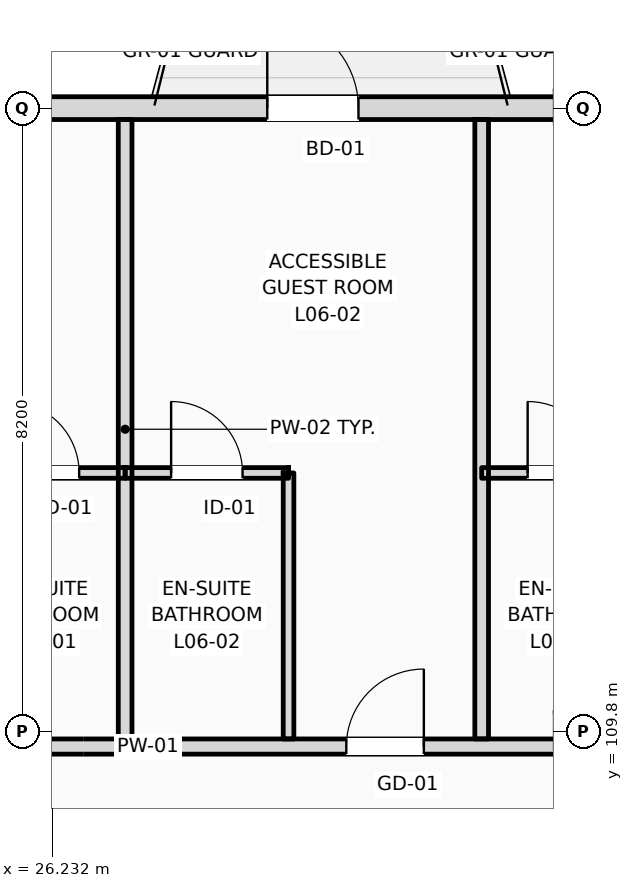
"""IFC4 building model, lengths in metres.
Left out: names, types, materials, properties, quantities, classifications, styles, units other than length and angle.
Written with IfcOpenShell. Run it as: python <this file> out.ifc"""

import sys

from ifc_helpers import new_model, si_unit, direction, frame, frame_2d, origin, place, context, subcontext, project, spatial, rectangle, extrude, element, fill, save


model = new_model("IFC4")
c1 = context("Model", 3, precision=1e-05, world=origin(), true_north=direction((0.0, 1.0)))
c2 = subcontext(c1, "Body", "Model", "MODEL_VIEW")
j1 = project(units=[si_unit("LENGTHUNIT", "METRE"), si_unit("PLANEANGLEUNIT", "RADIAN")], contexts=[c1])
p1 = place(None, origin())
s1 = spatial("IfcSite", under=j1, at=p1, CompositionType="ELEMENT")
p2 = place(p1, origin())
s2 = spatial("IfcBuilding", under=s1, at=p2, CompositionType="ELEMENT")
p3 = place(p2, frame((0.0, 0.0, 28.2)))
s3 = spatial("IfcBuildingStorey", under=s2, at=p3, CompositionType="ELEMENT", Elevation=28.2)
p4 = place(p3, frame((22.5, 118.0, 0.0), z_axis=(0.0, 0.0, 1.0), x_axis=(1.0, 0.0, 0.0)))
e1 = element("IfcWall", 1, at=p4, inside=s3, PredefinedType="STANDARD", context=c2, shape_type="SweptSolid", body=[
    extrude(rectangle(XDim=97.5, YDim=0.3, at=frame_2d((48.75, 0.0))), origin(), (0.0, 0.0, 1.0), 2.8),
])
p5 = place(p4, frame((0.91, 0.0, 0.9)))
e2 = element("IfcOpeningElement", 2, at=p5, cuts=e1, PredefinedType="OPENING", context=c2, shape_type="SweptSolid", body=[
    extrude(rectangle(XDim=0.9, YDim=1.72, at=frame_2d((0.45, 0.86))), frame((0.0, 0.16, 0.0), z_axis=(0.0, -1.0, 0.0), x_axis=(1.0, 0.0, 0.0)), (0.0, 0.0, 1.0), 0.32),
])
p6 = place(p4, frame((6.561, 0.0, 0.0)))
e3 = element("IfcOpeningElement", 3, at=p6, cuts=e1, PredefinedType="OPENING", context=c2, shape_type="SweptSolid", body=[
    extrude(rectangle(XDim=1.2, YDim=2.25, at=frame_2d((0.6, 1.125))), frame((0.0, 0.16, 0.0), z_axis=(0.0, -1.0, 0.0), x_axis=(1.0, 0.0, 0.0)), (0.0, 0.0, 1.0), 0.32),
])
p7 = place(p4, frame((11.477, 0.0, 0.9)))
e4 = element("IfcOpeningElement", 4, at=p7, cuts=e1, PredefinedType="OPENING", context=c2, shape_type="SweptSolid", body=[
    extrude(rectangle(XDim=1.1, YDim=1.5, at=frame_2d((0.55, 0.75))), frame((0.0, 0.16, 0.0), z_axis=(0.0, -1.0, 0.0), x_axis=(1.0, 0.0, 0.0)), (0.0, 0.0, 1.0), 0.32),
])
p8 = place(p4, frame((15.194, 0.0, 0.9)))
e5 = element("IfcOpeningElement", 5, at=p8, cuts=e1, PredefinedType="OPENING", context=c2, shape_type="SweptSolid", body=[
    extrude(rectangle(XDim=1.25, YDim=1.6, at=frame_2d((0.625, 0.8))), frame((0.0, 0.16, 0.0), z_axis=(0.0, -1.0, 0.0), x_axis=(1.0, 0.0, 0.0)), (0.0, 0.0, 1.0), 0.32),
])
p9 = place(p4, frame((19.509, 0.0, 0.9)))
e6 = element("IfcOpeningElement", 6, at=p9, cuts=e1, PredefinedType="OPENING", context=c2, shape_type="SweptSolid", body=[
    extrude(rectangle(XDim=1.4, YDim=1.7, at=frame_2d((0.7, 0.85))), frame((0.0, 0.16, 0.0), z_axis=(0.0, -1.0, 0.0), x_axis=(1.0, 0.0, 0.0)), (0.0, 0.0, 1.0), 0.32),
])
p10 = place(p4, frame((23.258, 0.0, 0.0)))
e7 = element("IfcOpeningElement", 7, at=p10, cuts=e1, PredefinedType="OPENING", context=c2, shape_type="SweptSolid", body=[
    extrude(rectangle(XDim=1.2, YDim=2.25, at=frame_2d((0.6, 1.125))), frame((0.0, 0.16, 0.0), z_axis=(0.0, -1.0, 0.0), x_axis=(1.0, 0.0, 0.0)), (0.0, 0.0, 1.0), 0.32),
])
p11 = place(p4, frame((28.115, 0.0, 0.9)))
e8 = element("IfcOpeningElement", 8, at=p11, cuts=e1, PredefinedType="OPENING", context=c2, shape_type="SweptSolid", body=[
    extrude(rectangle(XDim=1.75, YDim=1.72, at=frame_2d((0.875, 0.86))), frame((0.0, 0.16, 0.0), z_axis=(0.0, -1.0, 0.0), x_axis=(1.0, 0.0, 0.0)), (0.0, 0.0, 1.0), 0.32),
])
p12 = place(p4, frame((31.582, 0.0, 0.9)))
e9 = element("IfcOpeningElement", 9, at=p12, cuts=e1, PredefinedType="OPENING", context=c2, shape_type="SweptSolid", body=[
    extrude(rectangle(XDim=1.35, YDim=1.72, at=frame_2d((0.675, 0.86))), frame((0.0, 0.16, 0.0), z_axis=(0.0, -1.0, 0.0), x_axis=(1.0, 0.0, 0.0)), (0.0, 0.0, 1.0), 0.32),
])
p13 = place(p4, frame((37.379, 0.0, 0.0)))
e10 = element("IfcOpeningElement", 10, at=p13, cuts=e1, PredefinedType="OPENING", context=c2, shape_type="SweptSolid", body=[
    extrude(rectangle(XDim=1.2, YDim=2.25, at=frame_2d((0.6, 1.125))), frame((0.0, 0.16, 0.0), z_axis=(0.0, -1.0, 0.0), x_axis=(1.0, 0.0, 0.0)), (0.0, 0.0, 1.0), 0.32),
])
p14 = place(p4, frame((42.663, 0.0, 0.9)))
e11 = element("IfcOpeningElement", 11, at=p14, cuts=e1, PredefinedType="OPENING", context=c2, shape_type="SweptSolid", body=[
    extrude(rectangle(XDim=1.35, YDim=1.72, at=frame_2d((0.675, 0.86))), frame((0.0, 0.16, 0.0), z_axis=(0.0, -1.0, 0.0), x_axis=(1.0, 0.0, 0.0)), (0.0, 0.0, 1.0), 0.32),
])
p15 = place(p4, frame((45.119, 0.0, 0.9)))
e12 = element("IfcOpeningElement", 12, at=p15, cuts=e1, PredefinedType="OPENING", context=c2, shape_type="SweptSolid", body=[
    extrude(rectangle(XDim=2.871, YDim=1.72, at=frame_2d((1.436, 0.86))), frame((0.0, 0.16, 0.0), z_axis=(0.0, -1.0, 0.0), x_axis=(1.0, 0.0, 0.0)), (0.0, 0.0, 1.0), 0.32),
])
p16 = place(p4, frame((50.41, 0.0, 0.9)))
e13 = element("IfcOpeningElement", 13, at=p16, cuts=e1, PredefinedType="OPENING", context=c2, shape_type="SweptSolid", body=[
    extrude(rectangle(XDim=1.8, YDim=1.72, at=frame_2d((0.9, 0.86))), frame((0.0, 0.16, 0.0), z_axis=(0.0, -1.0, 0.0), x_axis=(1.0, 0.0, 0.0)), (0.0, 0.0, 1.0), 0.32),
])
p17 = place(p4, frame((54.375, 0.0, 0.0)))
e14 = element("IfcOpeningElement", 14, at=p17, cuts=e1, PredefinedType="OPENING", context=c2, shape_type="SweptSolid", body=[
    extrude(rectangle(XDim=1.2, YDim=2.25, at=frame_2d((0.6, 1.125))), frame((0.0, 0.16, 0.0), z_axis=(0.0, -1.0, 0.0), x_axis=(1.0, 0.0, 0.0)), (0.0, 0.0, 1.0), 0.32),
])
p18 = place(p4, frame((59.052, 0.0, 0.9)))
e15 = element("IfcOpeningElement", 15, at=p18, cuts=e1, PredefinedType="OPENING", context=c2, shape_type="SweptSolid", body=[
    extrude(rectangle(XDim=1.35, YDim=1.72, at=frame_2d((0.675, 0.86))), frame((0.0, 0.16, 0.0), z_axis=(0.0, -1.0, 0.0), x_axis=(1.0, 0.0, 0.0)), (0.0, 0.0, 1.0), 0.32),
])
p19 = place(p4, frame((62.768, 0.0, 0.9)))
e16 = element("IfcOpeningElement", 16, at=p19, cuts=e1, PredefinedType="OPENING", context=c2, shape_type="SweptSolid", body=[
    extrude(rectangle(XDim=1.5, YDim=1.72, at=frame_2d((0.75, 0.86))), frame((0.0, 0.16, 0.0), z_axis=(0.0, -1.0, 0.0), x_axis=(1.0, 0.0, 0.0)), (0.0, 0.0, 1.0), 0.32),
])
p20 = place(p4, frame((68.498, 0.0, 0.0)))
e17 = element("IfcOpeningElement", 17, at=p20, cuts=e1, PredefinedType="OPENING", context=c2, shape_type="SweptSolid", body=[
    extrude(rectangle(XDim=1.2, YDim=2.25, at=frame_2d((0.6, 1.125))), frame((0.0, 0.16, 0.0), z_axis=(0.0, -1.0, 0.0), x_axis=(1.0, 0.0, 0.0)), (0.0, 0.0, 1.0), 0.32),
])
p21 = place(p4, frame((71.265, 0.0, 0.9)))
e18 = element("IfcOpeningElement", 18, at=p21, cuts=e1, PredefinedType="OPENING", context=c2, shape_type="SweptSolid", body=[
    extrude(rectangle(XDim=0.9, YDim=1.72, at=frame_2d((0.45, 0.86))), frame((0.0, 0.16, 0.0), z_axis=(0.0, -1.0, 0.0), x_axis=(1.0, 0.0, 0.0)), (0.0, 0.0, 1.0), 0.32),
])
p22 = place(p4, frame((76.316, 0.0, 0.9)))
e19 = element("IfcOpeningElement", 19, at=p22, cuts=e1, PredefinedType="OPENING", context=c2, shape_type="SweptSolid", body=[
    extrude(rectangle(XDim=1.95, YDim=1.72, at=frame_2d((0.975, 0.86))), frame((0.0, 0.16, 0.0), z_axis=(0.0, -1.0, 0.0), x_axis=(1.0, 0.0, 0.0)), (0.0, 0.0, 1.0), 0.32),
])
p23 = place(p4, frame((81.632, 0.0, 0.9)))
e20 = element("IfcOpeningElement", 20, at=p23, cuts=e1, PredefinedType="OPENING", context=c2, shape_type="SweptSolid", body=[
    extrude(rectangle(XDim=1.35, YDim=1.72, at=frame_2d((0.675, 0.86))), frame((0.0, 0.16, 0.0), z_axis=(0.0, -1.0, 0.0), x_axis=(1.0, 0.0, 0.0)), (0.0, 0.0, 1.0), 0.32),
])
p24 = place(p4, frame((84.948, 0.0, 0.9)))
e21 = element("IfcOpeningElement", 21, at=p24, cuts=e1, PredefinedType="OPENING", context=c2, shape_type="SweptSolid", body=[
    extrude(rectangle(XDim=2.25, YDim=1.72, at=frame_2d((1.125, 0.86))), frame((0.0, 0.16, 0.0), z_axis=(0.0, -1.0, 0.0), x_axis=(1.0, 0.0, 0.0)), (0.0, 0.0, 1.0), 0.32),
])
p25 = place(p4, frame((90.063, 0.0, 0.9)))
e22 = element("IfcOpeningElement", 22, at=p25, cuts=e1, PredefinedType="OPENING", context=c2, shape_type="SweptSolid", body=[
    extrude(rectangle(XDim=1.8, YDim=1.72, at=frame_2d((0.9, 0.86))), frame((0.0, 0.16, 0.0), z_axis=(0.0, -1.0, 0.0), x_axis=(1.0, 0.0, 0.0)), (0.0, 0.0, 1.0), 0.32),
])
p26 = place(p4, frame((93.529, 0.0, 0.9)))
e23 = element("IfcOpeningElement", 23, at=p26, cuts=e1, PredefinedType="OPENING", context=c2, shape_type="SweptSolid", body=[
    extrude(rectangle(XDim=2.55, YDim=1.72, at=frame_2d((1.275, 0.86))), frame((0.0, 0.16, 0.0), z_axis=(0.0, -1.0, 0.0), x_axis=(1.0, 0.0, 0.0)), (0.0, 0.0, 1.0), 0.32),
])
p27 = place(p3, frame((10.65, 109.6, 0.0), z_axis=(0.0, 0.0, 1.0), x_axis=(1.0, 0.0, 0.0)))
e24 = element("IfcWall", 24, at=p27, inside=s3, PredefinedType="PARTITIONING", context=c2, shape_type="SweptSolid", body=[
    extrude(rectangle(XDim=109.21, YDim=0.2, at=frame_2d((54.605, 0.0))), origin(), (0.0, 0.0, 1.0), 2.8),
])
p28 = place(p27, frame((12.611, 0.0, 0.0)))
e25 = element("IfcOpeningElement", 25, at=p28, cuts=e24, PredefinedType="OPENING", context=c2, shape_type="SweptSolid", body=[
    extrude(rectangle(XDim=1.02, YDim=2.2, at=frame_2d((0.51, 1.1))), frame((0.0, 0.11, 0.0), z_axis=(0.0, -1.0, 0.0), x_axis=(1.0, 0.0, 0.0)), (0.0, 0.0, 1.0), 0.22),
])
p29 = place(p27, frame((19.451, 0.0, 0.0)))
e26 = element("IfcOpeningElement", 26, at=p29, cuts=e24, PredefinedType="OPENING", context=c2, shape_type="SweptSolid", body=[
    extrude(rectangle(XDim=1.02, YDim=2.2, at=frame_2d((0.51, 1.1))), frame((0.0, 0.11, 0.0), z_axis=(0.0, -1.0, 0.0), x_axis=(1.0, 0.0, 0.0)), (0.0, 0.0, 1.0), 0.22),
])
p30 = place(p27, frame((23.842, 0.0, 0.0)))
e27 = element("IfcOpeningElement", 27, at=p30, cuts=e24, PredefinedType="OPENING", context=c2, shape_type="SweptSolid", body=[
    extrude(rectangle(XDim=1.02, YDim=2.2, at=frame_2d((0.51, 1.1))), frame((0.0, 0.11, 0.0), z_axis=(0.0, -1.0, 0.0), x_axis=(1.0, 0.0, 0.0)), (0.0, 0.0, 1.0), 0.22),
])
p31 = place(p27, frame((26.084, 0.0, 0.0)))
e28 = element("IfcOpeningElement", 28, at=p31, cuts=e24, PredefinedType="OPENING", context=c2, shape_type="SweptSolid", body=[
    extrude(rectangle(XDim=1.02, YDim=2.2, at=frame_2d((0.51, 1.1))), frame((0.0, 0.11, 0.0), z_axis=(0.0, -1.0, 0.0), x_axis=(1.0, 0.0, 0.0)), (0.0, 0.0, 1.0), 0.22),
])
p32 = place(p27, frame((32.655, 0.0, 0.0)))
e29 = element("IfcOpeningElement", 29, at=p32, cuts=e24, PredefinedType="OPENING", context=c2, shape_type="SweptSolid", body=[
    extrude(rectangle(XDim=0.96, YDim=2.2, at=frame_2d((0.48, 1.1))), frame((0.0, 0.11, 0.0), z_axis=(0.0, -1.0, 0.0), x_axis=(1.0, 0.0, 0.0)), (0.0, 0.0, 1.0), 0.22),
])
p33 = place(p27, frame((34.895, 0.0, 0.0)))
e30 = element("IfcOpeningElement", 30, at=p33, cuts=e24, PredefinedType="OPENING", context=c2, shape_type="SweptSolid", body=[
    extrude(rectangle(XDim=0.96, YDim=2.2, at=frame_2d((0.48, 1.1))), frame((0.0, 0.11, 0.0), z_axis=(0.0, -1.0, 0.0), x_axis=(1.0, 0.0, 0.0)), (0.0, 0.0, 1.0), 0.22),
])
p34 = place(p27, frame((41.436, 0.0, 0.0)))
e31 = element("IfcOpeningElement", 31, at=p34, cuts=e24, PredefinedType="OPENING", context=c2, shape_type="SweptSolid", body=[
    extrude(rectangle(XDim=0.96, YDim=2.2, at=frame_2d((0.48, 1.1))), frame((0.0, 0.11, 0.0), z_axis=(0.0, -1.0, 0.0), x_axis=(1.0, 0.0, 0.0)), (0.0, 0.0, 1.0), 0.22),
])
p35 = place(p27, frame((43.427, 0.0, 0.0)))
e32 = element("IfcOpeningElement", 32, at=p35, cuts=e24, PredefinedType="OPENING", context=c2, shape_type="SweptSolid", body=[
    extrude(rectangle(XDim=0.96, YDim=2.2, at=frame_2d((0.48, 1.1))), frame((0.0, 0.11, 0.0), z_axis=(0.0, -1.0, 0.0), x_axis=(1.0, 0.0, 0.0)), (0.0, 0.0, 1.0), 0.22),
])
p36 = place(p27, frame((50.218, 0.0, 0.0)))
e33 = element("IfcOpeningElement", 33, at=p36, cuts=e24, PredefinedType="OPENING", context=c2, shape_type="SweptSolid", body=[
    extrude(rectangle(XDim=0.96, YDim=2.2, at=frame_2d((0.48, 1.1))), frame((0.0, 0.11, 0.0), z_axis=(0.0, -1.0, 0.0), x_axis=(1.0, 0.0, 0.0)), (0.0, 0.0, 1.0), 0.22),
])
p37 = place(p27, frame((54.859, 0.0, 0.0)))
e34 = element("IfcOpeningElement", 34, at=p37, cuts=e24, PredefinedType="OPENING", context=c2, shape_type="SweptSolid", body=[
    extrude(rectangle(XDim=0.96, YDim=2.2, at=frame_2d((0.48, 1.1))), frame((0.0, 0.11, 0.0), z_axis=(0.0, -1.0, 0.0), x_axis=(1.0, 0.0, 0.0)), (0.0, 0.0, 1.0), 0.22),
])
p38 = place(p27, frame((59.0, 0.0, 0.0)))
e35 = element("IfcOpeningElement", 35, at=p38, cuts=e24, PredefinedType="OPENING", context=c2, shape_type="SweptSolid", body=[
    extrude(rectangle(XDim=0.96, YDim=2.2, at=frame_2d((0.48, 1.1))), frame((0.0, 0.11, 0.0), z_axis=(0.0, -1.0, 0.0), x_axis=(1.0, 0.0, 0.0)), (0.0, 0.0, 1.0), 0.22),
])
p39 = place(p27, frame((63.39, 0.0, 0.0)))
e36 = element("IfcOpeningElement", 36, at=p39, cuts=e24, PredefinedType="OPENING", context=c2, shape_type="SweptSolid", body=[
    extrude(rectangle(XDim=0.96, YDim=2.2, at=frame_2d((0.48, 1.1))), frame((0.0, 0.11, 0.0), z_axis=(0.0, -1.0, 0.0), x_axis=(1.0, 0.0, 0.0)), (0.0, 0.0, 1.0), 0.22),
])
p40 = place(p27, frame((65.631, 0.0, 0.0)))
e37 = element("IfcOpeningElement", 37, at=p40, cuts=e24, PredefinedType="OPENING", context=c2, shape_type="SweptSolid", body=[
    extrude(rectangle(XDim=0.96, YDim=2.2, at=frame_2d((0.48, 1.1))), frame((0.0, 0.11, 0.0), z_axis=(0.0, -1.0, 0.0), x_axis=(1.0, 0.0, 0.0)), (0.0, 0.0, 1.0), 0.22),
])
p41 = place(p27, frame((72.172, 0.0, 0.0)))
e38 = element("IfcOpeningElement", 38, at=p41, cuts=e24, PredefinedType="OPENING", context=c2, shape_type="SweptSolid", body=[
    extrude(rectangle(XDim=0.96, YDim=2.2, at=frame_2d((0.48, 1.1))), frame((0.0, 0.11, 0.0), z_axis=(0.0, -1.0, 0.0), x_axis=(1.0, 0.0, 0.0)), (0.0, 0.0, 1.0), 0.22),
])
p42 = place(p27, frame((74.413, 0.0, 0.0)))
e39 = element("IfcOpeningElement", 39, at=p42, cuts=e24, PredefinedType="OPENING", context=c2, shape_type="SweptSolid", body=[
    extrude(rectangle(XDim=0.96, YDim=2.2, at=frame_2d((0.48, 1.1))), frame((0.0, 0.11, 0.0), z_axis=(0.0, -1.0, 0.0), x_axis=(1.0, 0.0, 0.0)), (0.0, 0.0, 1.0), 0.22),
])
p43 = place(p27, frame((80.954, 0.0, 0.0)))
e40 = element("IfcOpeningElement", 40, at=p43, cuts=e24, PredefinedType="OPENING", context=c2, shape_type="SweptSolid", body=[
    extrude(rectangle(XDim=0.96, YDim=2.2, at=frame_2d((0.48, 1.1))), frame((0.0, 0.11, 0.0), z_axis=(0.0, -1.0, 0.0), x_axis=(1.0, 0.0, 0.0)), (0.0, 0.0, 1.0), 0.22),
])
p44 = place(p27, frame((83.195, 0.0, 0.0)))
e41 = element("IfcOpeningElement", 41, at=p44, cuts=e24, PredefinedType="OPENING", context=c2, shape_type="SweptSolid", body=[
    extrude(rectangle(XDim=0.96, YDim=2.2, at=frame_2d((0.48, 1.1))), frame((0.0, 0.11, 0.0), z_axis=(0.0, -1.0, 0.0), x_axis=(1.0, 0.0, 0.0)), (0.0, 0.0, 1.0), 0.22),
])
p45 = place(p27, frame((89.735, 0.0, 0.0)))
e42 = element("IfcOpeningElement", 42, at=p45, cuts=e24, PredefinedType="OPENING", context=c2, shape_type="SweptSolid", body=[
    extrude(rectangle(XDim=0.96, YDim=2.2, at=frame_2d((0.48, 1.1))), frame((0.0, 0.11, 0.0), z_axis=(0.0, -1.0, 0.0), x_axis=(1.0, 0.0, 0.0)), (0.0, 0.0, 1.0), 0.22),
])
p46 = place(p27, frame((94.126, 0.0, 0.0)))
e43 = element("IfcOpeningElement", 43, at=p46, cuts=e24, PredefinedType="OPENING", context=c2, shape_type="SweptSolid", body=[
    extrude(rectangle(XDim=0.96, YDim=2.2, at=frame_2d((0.48, 1.1))), frame((0.0, 0.11, 0.0), z_axis=(0.0, -1.0, 0.0), x_axis=(1.0, 0.0, 0.0)), (0.0, 0.0, 1.0), 0.22),
])
p47 = place(p27, frame((98.517, 0.0, 0.0)))
e44 = element("IfcOpeningElement", 44, at=p47, cuts=e24, PredefinedType="OPENING", context=c2, shape_type="SweptSolid", body=[
    extrude(rectangle(XDim=0.96, YDim=2.2, at=frame_2d((0.48, 1.1))), frame((0.0, 0.11, 0.0), z_axis=(0.0, -1.0, 0.0), x_axis=(1.0, 0.0, 0.0)), (0.0, 0.0, 1.0), 0.22),
])
p48 = place(p27, frame((102.908, 0.0, 0.0)))
e45 = element("IfcOpeningElement", 45, at=p48, cuts=e24, PredefinedType="OPENING", context=c2, shape_type="SweptSolid", body=[
    extrude(rectangle(XDim=0.96, YDim=2.2, at=frame_2d((0.48, 1.1))), frame((0.0, 0.11, 0.0), z_axis=(0.0, -1.0, 0.0), x_axis=(1.0, 0.0, 0.0)), (0.0, 0.0, 1.0), 0.22),
])
p49 = place(p27, frame((105.099, 0.0, 0.0)))
e46 = element("IfcOpeningElement", 46, at=p49, cuts=e24, PredefinedType="OPENING", context=c2, shape_type="SweptSolid", body=[
    extrude(rectangle(XDim=0.96, YDim=2.2, at=frame_2d((0.48, 1.1))), frame((0.0, 0.11, 0.0), z_axis=(0.0, -1.0, 0.0), x_axis=(1.0, 0.0, 0.0)), (0.0, 0.0, 1.0), 0.22),
])
p50 = place(p27, frame((2.716, 0.0, 0.0)))
e47 = element("IfcOpeningElement", 47, at=p50, cuts=e24, PredefinedType="OPENING", context=c2, shape_type="SweptSolid", body=[
    extrude(rectangle(XDim=1.35, YDim=2.25, at=frame_2d((0.675, 1.125))), frame((0.0, 0.11, 0.0), z_axis=(0.0, -1.0, 0.0), x_axis=(1.0, 0.0, 0.0)), (0.0, 0.0, 1.0), 0.22),
])
p51 = place(p27, frame((6.65, 0.0, 0.0)))
e48 = element("IfcOpeningElement", 48, at=p51, cuts=e24, PredefinedType="OPENING", context=c2, shape_type="SweptSolid", body=[
    extrude(rectangle(XDim=1.35, YDim=2.25, at=frame_2d((0.675, 1.125))), frame((0.0, 0.11, 0.0), z_axis=(0.0, -1.0, 0.0), x_axis=(1.0, 0.0, 0.0)), (0.0, 0.0, 1.0), 0.22),
])
p52 = place(p27, frame((10.583, 0.0, 0.0)))
e49 = element("IfcOpeningElement", 49, at=p52, cuts=e24, PredefinedType="OPENING", context=c2, shape_type="SweptSolid", body=[
    extrude(rectangle(XDim=1.35, YDim=2.25, at=frame_2d((0.675, 1.125))), frame((0.0, 0.11, 0.0), z_axis=(0.0, -1.0, 0.0), x_axis=(1.0, 0.0, 0.0)), (0.0, 0.0, 1.0), 0.22),
])
p53 = place(p3, frame((27.191, 109.7, 0.0), z_axis=(0.0, 0.0, 1.0), x_axis=(0.0, 1.0, 0.0)))
e50 = element("IfcWall", 50, at=p53, inside=s3, PredefinedType="PARTITIONING", context=c2, shape_type="SweptSolid", body=[
    extrude(rectangle(XDim=8.15, YDim=0.18, at=frame_2d((4.075, 0.0))), origin(), (0.0, 0.0, 1.0), 3.36),
])
p54 = place(p3, frame((25.041, 113.2, 0.0), z_axis=(0.0, 0.0, 1.0), x_axis=(1.0, 0.0, 0.0)))
e51 = element("IfcWall", 51, at=p54, inside=s3, PredefinedType="PARTITIONING", context=c2, shape_type="SweptSolid", body=[
    extrude(rectangle(XDim=2.15, YDim=0.14, at=frame_2d((1.075, 0.0))), origin(), (0.0, 0.0, 1.0), 3.36),
])
p55 = place(p54, frame((0.605, 0.0, 0.0)))
e52 = element("IfcOpeningElement", 52, at=p55, cuts=e51, PredefinedType="OPENING", context=c2, shape_type="SweptSolid", body=[
    extrude(rectangle(XDim=0.94, YDim=2.15, at=frame_2d((0.47, 1.075))), frame((0.0, 0.08, 0.0), z_axis=(0.0, -1.0, 0.0), x_axis=(1.0, 0.0, 0.0)), (0.0, 0.0, 1.0), 0.16),
])
p56 = place(p3, frame((31.882, 109.7, 0.0), z_axis=(0.0, 0.0, 1.0), x_axis=(0.0, 1.0, 0.0)))
e53 = element("IfcWall", 53, at=p56, inside=s3, PredefinedType="PARTITIONING", context=c2, shape_type="SweptSolid", body=[
    extrude(rectangle(XDim=8.15, YDim=0.18, at=frame_2d((4.075, 0.0))), origin(), (0.0, 0.0, 1.0), 3.36),
])
p57 = place(p3, frame((29.341, 109.7, 0.0), z_axis=(0.0, 0.0, 1.0), x_axis=(0.0, 1.0, 0.0)))
e54 = element("IfcWall", 54, at=p57, inside=s3, PredefinedType="PARTITIONING", context=c2, shape_type="SweptSolid", body=[
    extrude(rectangle(XDim=3.5, YDim=0.14, at=frame_2d((1.75, 0.0))), origin(), (0.0, 0.0, 1.0), 3.36),
])
p58 = place(p3, frame((27.191, 113.2, 0.0), z_axis=(0.0, 0.0, 1.0), x_axis=(1.0, 0.0, 0.0)))
e55 = element("IfcWall", 55, at=p58, inside=s3, PredefinedType="PARTITIONING", context=c2, shape_type="SweptSolid", body=[
    extrude(rectangle(XDim=2.15, YDim=0.14, at=frame_2d((1.075, 0.0))), origin(), (0.0, 0.0, 1.0), 3.36),
])
p59 = place(p58, frame((0.605, 0.0, 0.0)))
e56 = element("IfcOpeningElement", 56, at=p59, cuts=e55, PredefinedType="OPENING", context=c2, shape_type="SweptSolid", body=[
    extrude(rectangle(XDim=0.94, YDim=2.15, at=frame_2d((0.47, 1.075))), frame((0.0, 0.08, 0.0), z_axis=(0.0, -1.0, 0.0), x_axis=(1.0, 0.0, 0.0)), (0.0, 0.0, 1.0), 0.16),
])
p60 = place(p3, frame((31.882, 113.2, 0.0), z_axis=(0.0, 0.0, 1.0), x_axis=(1.0, 0.0, 0.0)))
e57 = element("IfcWall", 57, at=p60, inside=s3, PredefinedType="PARTITIONING", context=c2, shape_type="SweptSolid", body=[
    extrude(rectangle(XDim=2.15, YDim=0.14, at=frame_2d((1.075, 0.0))), origin(), (0.0, 0.0, 1.0), 3.36),
])
p61 = place(p60, frame((0.605, 0.0, 0.0)))
e58 = element("IfcOpeningElement", 58, at=p61, cuts=e57, PredefinedType="OPENING", context=c2, shape_type="SweptSolid", body=[
    extrude(rectangle(XDim=0.94, YDim=2.15, at=frame_2d((0.47, 1.075))), frame((0.0, 0.08, 0.0), z_axis=(0.0, -1.0, 0.0), x_axis=(1.0, 0.0, 0.0)), (0.0, 0.0, 1.0), 0.16),
])
p62 = place(p6, origin())
e59 = element("IfcDoor", 59, at=p62, inside=s3, OperationType="SINGLE_SWING_LEFT", PredefinedType="DOOR", context=c2, shape_type="SweptSolid", body=[
    extrude(rectangle(XDim=1.2, YDim=2.25, at=frame_2d((0.6, 1.125))), frame((0.0, 0.025, 0.0), z_axis=(0.0, -1.0, 0.0), x_axis=(1.0, 0.0, 0.0)), (0.0, 0.0, 1.0), 0.05),
])
fill(e3, e59)
p63 = place(p55, origin())
e60 = element("IfcDoor", 60, at=p63, inside=s3, OperationType="SINGLE_SWING_LEFT", PredefinedType="DOOR", context=c2, shape_type="SweptSolid", body=[
    extrude(rectangle(XDim=0.94, YDim=2.15, at=frame_2d((0.47, 1.075))), frame((0.0, 0.025, 0.0), z_axis=(0.0, -1.0, 0.0), x_axis=(1.0, 0.0, 0.0)), (0.0, 0.0, 1.0), 0.05),
])
fill(e52, e60)
p64 = place(p29, origin())
e61 = element("IfcDoor", 61, at=p64, inside=s3, OperationType="SINGLE_SWING_RIGHT", PredefinedType="DOOR", context=c2, shape_type="SweptSolid", body=[
    extrude(rectangle(XDim=1.02, YDim=2.2, at=frame_2d((0.51, 1.1))), frame((0.0, 0.025, 0.0), z_axis=(0.0, -1.0, 0.0), x_axis=(1.0, 0.0, 0.0)), (0.0, 0.0, 1.0), 0.05),
])
fill(e26, e61)
p65 = place(p59, origin())
e62 = element("IfcDoor", 62, at=p65, inside=s3, OperationType="SINGLE_SWING_LEFT", PredefinedType="DOOR", context=c2, shape_type="SweptSolid", body=[
    extrude(rectangle(XDim=0.94, YDim=2.15, at=frame_2d((0.47, 1.075))), frame((0.0, 0.025, 0.0), z_axis=(0.0, -1.0, 0.0), x_axis=(1.0, 0.0, 0.0)), (0.0, 0.0, 1.0), 0.05),
])
fill(e56, e62)
p66 = place(p61, origin())
e63 = element("IfcDoor", 63, at=p66, inside=s3, OperationType="SINGLE_SWING_LEFT", PredefinedType="DOOR", context=c2, shape_type="SweptSolid", body=[
    extrude(rectangle(XDim=0.94, YDim=2.15, at=frame_2d((0.47, 1.075))), frame((0.0, 0.025, 0.0), z_axis=(0.0, -1.0, 0.0), x_axis=(1.0, 0.0, 0.0)), (0.0, 0.0, 1.0), 0.05),
])
fill(e58, e63)
save(model, sys.argv[1])
